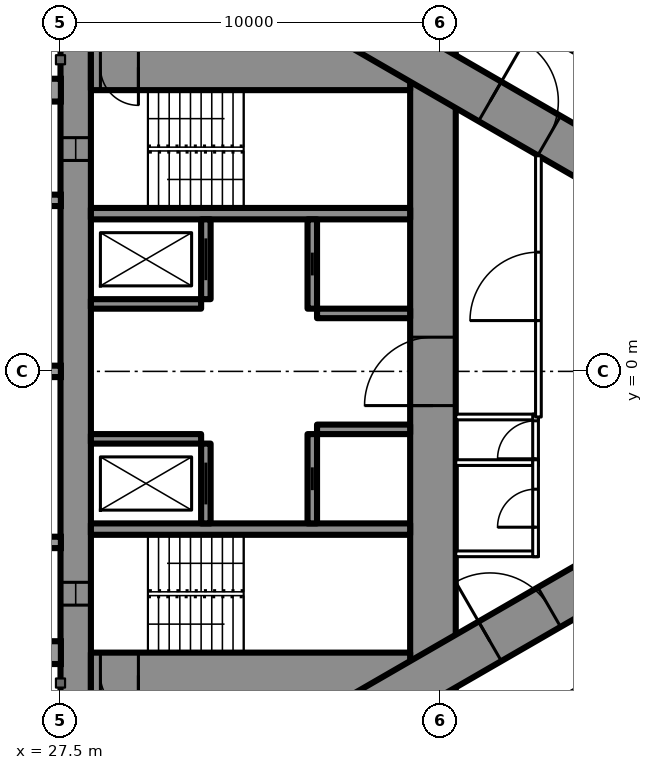
"""IFC4 building model, lengths in metres.
Left out: names, types, materials, properties, quantities, classifications, styles, units other than length and angle.
Written with IfcOpenShell. Run it as: python <this file> out.ifc"""

import sys

from ifc_helpers import new_model, si_unit, direction, frame, frame_2d, origin, place, context, subcontext, project, spatial, rectangle, extrude, element, fill, save


model = new_model("IFC4")
c1 = context("Model", 3, precision=1e-05, world=origin(), true_north=direction((0.0, 1.0)))
c2 = subcontext(c1, "Body", "Model", "MODEL_VIEW")
j1 = project(units=[si_unit("LENGTHUNIT", "METRE"), si_unit("PLANEANGLEUNIT", "RADIAN")], contexts=[c1])
p1 = place(None, origin())
s1 = spatial("IfcSite", under=j1, at=p1, CompositionType="ELEMENT")
p2 = place(p1, origin())
s2 = spatial("IfcBuilding", under=s1, at=p2, CompositionType="ELEMENT")
p3 = place(p2, frame((0.0, 0.0, 60.0)))
s3 = spatial("IfcBuildingStorey", under=s2, at=p3, CompositionType="ELEMENT", Elevation=60.0)
p4 = place(p3, frame((27.9, -8.6, 0.0), z_axis=(0.0, 0.0, 1.0), x_axis=(0.0, 1.0, 0.0)))
e1 = element("IfcWall", 1, at=p4, inside=s3, PredefinedType="SHEAR", context=c2, shape_type="SweptSolid", body=[
    extrude(rectangle(XDim=17.2, YDim=0.8, at=frame_2d((8.6, 0.0))), origin(), (0.0, 0.0, 1.0), 3.5),
])
p5 = place(p4, frame((2.45, 0.0, 0.6)))
e2 = element("IfcOpeningElement", 2, at=p5, cuts=e1, PredefinedType="OPENING", context=c2, shape_type="SweptSolid", body=[
    extrude(rectangle(XDim=0.6, YDim=2.1, at=frame_2d((0.3, 1.05))), frame((0.0, 0.41, 0.0), z_axis=(0.0, -1.0, 0.0), x_axis=(1.0, 0.0, 0.0)), (0.0, 0.0, 1.0), 0.82),
])
p6 = place(p4, frame((14.15, 0.0, 0.6)))
e3 = element("IfcOpeningElement", 3, at=p6, cuts=e1, PredefinedType="OPENING", context=c2, shape_type="SweptSolid", body=[
    extrude(rectangle(XDim=0.6, YDim=2.1, at=frame_2d((0.3, 1.05))), frame((0.0, 0.41, 0.0), z_axis=(0.0, -1.0, 0.0), x_axis=(1.0, 0.0, 0.0)), (0.0, 0.0, 1.0), 0.82),
])
p7 = place(p3, frame((37.3, -8.6, 0.0), z_axis=(0.0, 0.0, 1.0), x_axis=(0.0, 1.0, 0.0)))
e4 = element("IfcWall", 4, at=p7, inside=s3, PredefinedType="SHEAR", context=c2, shape_type="SweptSolid", body=[
    extrude(rectangle(XDim=17.2, YDim=1.2, at=frame_2d((8.6, 0.0))), origin(), (0.0, 0.0, 1.0), 3.5),
])
p8 = place(p7, frame((7.7, 0.0, 0.0)))
e5 = element("IfcOpeningElement", 5, at=p8, cuts=e4, PredefinedType="OPENING", context=c2, shape_type="SweptSolid", body=[
    extrude(rectangle(XDim=1.8, YDim=2.2, at=frame_2d((0.9, 1.1))), frame((0.0, 0.61, 0.0), z_axis=(0.0, -1.0, 0.0), x_axis=(1.0, 0.0, 0.0)), (0.0, 0.0, 1.0), 1.22),
])
p9 = place(p3, frame((28.3, -8.0, 0.0), z_axis=(0.0, 0.0, 1.0), x_axis=(1.0, 0.0, 0.0)))
e6 = element("IfcWall", 6, at=p9, inside=s3, PredefinedType="SHEAR", context=c2, shape_type="SweptSolid", body=[
    extrude(rectangle(XDim=8.4, YDim=1.2, at=frame_2d((4.2, 0.0))), origin(), (0.0, 0.0, 1.0), 3.5),
])
p10 = place(p9, frame((0.25, 0.0, 0.0)))
e7 = element("IfcOpeningElement", 7, at=p10, cuts=e6, PredefinedType="OPENING", context=c2, shape_type="SweptSolid", body=[
    extrude(rectangle(XDim=1.0, YDim=2.2, at=frame_2d((0.5, 1.1))), frame((0.0, 0.61, 0.0), z_axis=(0.0, -1.0, 0.0), x_axis=(1.0, 0.0, 0.0)), (0.0, 0.0, 1.0), 1.22),
])
p11 = place(p3, frame((28.3, 8.0, 0.0), z_axis=(0.0, 0.0, 1.0), x_axis=(1.0, 0.0, 0.0)))
e8 = element("IfcWall", 8, at=p11, inside=s3, PredefinedType="SHEAR", context=c2, shape_type="SweptSolid", body=[
    extrude(rectangle(XDim=8.4, YDim=1.2, at=frame_2d((4.2, 0.0))), origin(), (0.0, 0.0, 1.0), 3.5),
])
p12 = place(p11, frame((0.25, 0.0, 0.0)))
e9 = element("IfcOpeningElement", 9, at=p12, cuts=e8, PredefinedType="OPENING", context=c2, shape_type="SweptSolid", body=[
    extrude(rectangle(XDim=1.0, YDim=2.2, at=frame_2d((0.5, 1.1))), frame((0.0, 0.61, 0.0), z_axis=(0.0, -1.0, 0.0), x_axis=(1.0, 0.0, 0.0)), (0.0, 0.0, 1.0), 1.22),
])
for number, where, z_axis, x_axis in (
    (10, (28.3, -4.15, 0.0), (0.0, 0.0, 1.0), (1.0, 0.0, 0.0)),
    (11, (28.3, 4.15, 0.0), (0.0, 0.0, 1.0), (1.0, 0.0, 0.0)),
):
    element("IfcWall", number, at=place(p3, frame(where, z_axis=z_axis, x_axis=x_axis)), inside=s3, PredefinedType="SHEAR", context=c2, shape_type="SweptSolid", body=[
        extrude(rectangle(XDim=8.4, YDim=0.3, at=frame_2d((4.2, 0.0))), origin(), (0.0, 0.0, 1.0), 3.5),
    ])
p13 = place(p3, frame((31.325, -4.0, 0.0), z_axis=(0.0, 0.0, 1.0), x_axis=(0.0, 1.0, 0.0)))
e12 = element("IfcWall", 12, at=p13, inside=s3, PredefinedType="SHEAR", context=c2, shape_type="SweptSolid", body=[
    extrude(rectangle(XDim=2.1, YDim=0.25, at=frame_2d((1.05, 0.0))), origin(), (0.0, 0.0, 1.0), 3.5),
])
p14 = place(p13, frame((0.5, 0.0, 0.0)))
e13 = element("IfcOpeningElement", 13, at=p14, cuts=e12, PredefinedType="OPENING", context=c2, shape_type="SweptSolid", body=[
    extrude(rectangle(XDim=1.1, YDim=2.2, at=frame_2d((0.55, 1.1))), frame((0.0, 0.135, 0.0), z_axis=(0.0, -1.0, 0.0), x_axis=(1.0, 0.0, 0.0)), (0.0, 0.0, 1.0), 0.27),
])
p15 = place(p3, frame((34.125, -4.0, 0.0), z_axis=(0.0, 0.0, 1.0), x_axis=(0.0, 1.0, 0.0)))
e14 = element("IfcWall", 14, at=p15, inside=s3, PredefinedType="SHEAR", context=c2, shape_type="SweptSolid", body=[
    extrude(rectangle(XDim=2.35, YDim=0.25, at=frame_2d((1.175, 0.0))), origin(), (0.0, 0.0, 1.0), 3.5),
])
p16 = place(p15, frame((0.875, 0.0, 0.0)))
e15 = element("IfcOpeningElement", 15, at=p16, cuts=e14, PredefinedType="OPENING", context=c2, shape_type="SweptSolid", body=[
    extrude(rectangle(XDim=0.6, YDim=2.0, at=frame_2d((0.3, 1.0))), frame((0.0, 0.135, 0.0), z_axis=(0.0, -1.0, 0.0), x_axis=(1.0, 0.0, 0.0)), (0.0, 0.0, 1.0), 0.27),
])
p17 = place(p3, frame((28.3, -1.775, 0.0), z_axis=(0.0, 0.0, 1.0), x_axis=(1.0, 0.0, 0.0)))
e16 = element("IfcWall", 16, at=p17, inside=s3, PredefinedType="SHEAR", context=c2, shape_type="SweptSolid", body=[
    extrude(rectangle(XDim=2.9, YDim=0.25, at=frame_2d((1.45, 0.0))), origin(), (0.0, 0.0, 1.0), 3.5),
])
p18 = place(p3, frame((34.25, -1.525, 0.0), z_axis=(0.0, 0.0, 1.0), x_axis=(1.0, 0.0, 0.0)))
e17 = element("IfcWall", 17, at=p18, inside=s3, PredefinedType="SHEAR", context=c2, shape_type="SweptSolid", body=[
    extrude(rectangle(XDim=2.45, YDim=0.25, at=frame_2d((1.225, 0.0))), origin(), (0.0, 0.0, 1.0), 3.5),
])
p19 = place(p3, frame((31.325, 1.9, 0.0), z_axis=(0.0, 0.0, 1.0), x_axis=(0.0, 1.0, 0.0)))
e18 = element("IfcWall", 18, at=p19, inside=s3, PredefinedType="SHEAR", context=c2, shape_type="SweptSolid", body=[
    extrude(rectangle(XDim=2.1, YDim=0.25, at=frame_2d((1.05, 0.0))), origin(), (0.0, 0.0, 1.0), 3.5),
])
p20 = place(p19, frame((0.5, 0.0, 0.0)))
e19 = element("IfcOpeningElement", 19, at=p20, cuts=e18, PredefinedType="OPENING", context=c2, shape_type="SweptSolid", body=[
    extrude(rectangle(XDim=1.1, YDim=2.2, at=frame_2d((0.55, 1.1))), frame((0.0, 0.135, 0.0), z_axis=(0.0, -1.0, 0.0), x_axis=(1.0, 0.0, 0.0)), (0.0, 0.0, 1.0), 0.27),
])
p21 = place(p3, frame((34.125, 1.65, 0.0), z_axis=(0.0, 0.0, 1.0), x_axis=(0.0, 1.0, 0.0)))
e20 = element("IfcWall", 20, at=p21, inside=s3, PredefinedType="SHEAR", context=c2, shape_type="SweptSolid", body=[
    extrude(rectangle(XDim=2.35, YDim=0.25, at=frame_2d((1.175, 0.0))), origin(), (0.0, 0.0, 1.0), 3.5),
])
p22 = place(p21, frame((0.875, 0.0, 0.0)))
e21 = element("IfcOpeningElement", 21, at=p22, cuts=e20, PredefinedType="OPENING", context=c2, shape_type="SweptSolid", body=[
    extrude(rectangle(XDim=0.6, YDim=2.0, at=frame_2d((0.3, 1.0))), frame((0.0, 0.135, 0.0), z_axis=(0.0, -1.0, 0.0), x_axis=(1.0, 0.0, 0.0)), (0.0, 0.0, 1.0), 0.27),
])
p23 = place(p3, frame((28.3, 1.775, 0.0), z_axis=(0.0, 0.0, 1.0), x_axis=(1.0, 0.0, 0.0)))
e22 = element("IfcWall", 22, at=p23, inside=s3, PredefinedType="SHEAR", context=c2, shape_type="SweptSolid", body=[
    extrude(rectangle(XDim=2.9, YDim=0.25, at=frame_2d((1.45, 0.0))), origin(), (0.0, 0.0, 1.0), 3.5),
])
p24 = place(p3, frame((34.25, 1.525, 0.0), z_axis=(0.0, 0.0, 1.0), x_axis=(1.0, 0.0, 0.0)))
e23 = element("IfcWall", 23, at=p24, inside=s3, PredefinedType="SHEAR", context=c2, shape_type="SweptSolid", body=[
    extrude(rectangle(XDim=2.45, YDim=0.25, at=frame_2d((1.225, 0.0))), origin(), (0.0, 0.0, 1.0), 3.5),
])
p25 = place(p3, frame((27.2, -13.8, 0.0), z_axis=(0.0, 0.0, 1.0), x_axis=(0.866027159892, 0.499996958321, 0.0)))
e24 = element("IfcWall", 24, at=p25, inside=s3, PredefinedType="SHEAR", context=c2, shape_type="SweptSolid", body=[
    extrude(rectangle(XDim=27.947, YDim=1.2, at=frame_2d((13.973, 0.0))), origin(), (0.0, 0.0, 1.0), 3.5),
])
p26 = place(p25, frame((4.6, 0.0, 0.0)))
e25 = element("IfcOpeningElement", 25, at=p26, cuts=e24, PredefinedType="OPENING", context=c2, shape_type="SweptSolid", body=[
    extrude(rectangle(XDim=1.0, YDim=2.2, at=frame_2d((0.5, 1.1))), frame((0.0, 0.61, 0.0), z_axis=(0.0, -1.0, 0.0), x_axis=(1.0, 0.0, 0.0)), (0.0, 0.0, 1.0), 1.22),
])
p27 = place(p25, frame((13.395, 0.0, 0.0)))
e26 = element("IfcOpeningElement", 26, at=p27, cuts=e24, PredefinedType="OPENING", context=c2, shape_type="SweptSolid", body=[
    extrude(rectangle(XDim=1.8, YDim=2.2, at=frame_2d((0.9, 1.1))), frame((0.0, 0.61, 0.0), z_axis=(0.0, -1.0, 0.0), x_axis=(1.0, 0.0, 0.0)), (0.0, 0.0, 1.0), 1.22),
])
p28 = place(p3, frame((27.2, 13.8, 0.0), z_axis=(0.0, 0.0, 1.0), x_axis=(0.866024515034, -0.500001539357, 0.0)))
e27 = element("IfcWall", 27, at=p28, inside=s3, PredefinedType="SHEAR", context=c2, shape_type="SweptSolid", body=[
    extrude(rectangle(XDim=26.907, YDim=1.2, at=frame_2d((13.454, 0.0))), origin(), (0.0, 0.0, 1.0), 3.5),
])
p29 = place(p28, frame((4.6, 0.0, 0.0)))
e28 = element("IfcOpeningElement", 28, at=p29, cuts=e27, PredefinedType="OPENING", context=c2, shape_type="SweptSolid", body=[
    extrude(rectangle(XDim=1.0, YDim=2.2, at=frame_2d((0.5, 1.1))), frame((0.0, 0.61, 0.0), z_axis=(0.0, -1.0, 0.0), x_axis=(1.0, 0.0, 0.0)), (0.0, 0.0, 1.0), 1.22),
])
p30 = place(p28, frame((13.395, 0.0, 0.0)))
e29 = element("IfcOpeningElement", 29, at=p30, cuts=e27, PredefinedType="OPENING", context=c2, shape_type="SweptSolid", body=[
    extrude(rectangle(XDim=1.8, YDim=2.2, at=frame_2d((0.9, 1.1))), frame((0.0, 0.61, 0.0), z_axis=(0.0, -1.0, 0.0), x_axis=(1.0, 0.0, 0.0)), (0.0, 0.0, 1.0), 1.22),
])
p31 = place(p3, frame((36.834, 10.894, 0.0), z_axis=(0.0, 0.0, 1.0), x_axis=(0.866028157229, -0.499995230863, 0.0)))
e30 = element("IfcWall", 30, at=p31, inside=s3, PredefinedType="PARTITIONING", context=c2, shape_type="SweptSolid", body=[
    extrude(rectangle(XDim=21.667, YDim=0.2, at=frame_2d((10.833, 0.0))), origin(), (0.0, 0.0, 1.0), 3.25),
])
p32 = place(p31, frame((14.55, 0.0, 0.0)))
e31 = element("IfcOpeningElement", 31, at=p32, cuts=e30, PredefinedType="OPENING", context=c2, shape_type="SweptSolid", body=[
    extrude(rectangle(XDim=0.95, YDim=2.2, at=frame_2d((0.475, 1.1))), frame((0.0, 0.11, 0.0), z_axis=(0.0, -1.0, 0.0), x_axis=(1.0, 0.0, 0.0)), (0.0, 0.0, 1.0), 0.22),
])
p33 = place(p31, frame((10.5, 0.0, 0.0)))
e32 = element("IfcOpeningElement", 32, at=p33, cuts=e30, PredefinedType="OPENING", context=c2, shape_type="SweptSolid", body=[
    extrude(rectangle(XDim=0.95, YDim=2.2, at=frame_2d((0.475, 1.1))), frame((0.0, 0.11, 0.0), z_axis=(0.0, -1.0, 0.0), x_axis=(1.0, 0.0, 0.0)), (0.0, 0.0, 1.0), 0.22),
])
p34 = place(p31, frame((4.292, 0.0, 0.0)))
e33 = element("IfcOpeningElement", 33, at=p34, cuts=e30, PredefinedType="OPENING", context=c2, shape_type="SweptSolid", body=[
    extrude(rectangle(XDim=1.0, YDim=2.2, at=frame_2d((0.5, 1.1))), frame((0.0, 0.11, 0.0), z_axis=(0.0, -1.0, 0.0), x_axis=(1.0, 0.0, 0.0)), (0.0, 0.0, 1.0), 0.22),
])
p35 = place(p31, frame((0.246, 0.0, 0.0)))
e34 = element("IfcOpeningElement", 34, at=p35, cuts=e30, PredefinedType="OPENING", context=c2, shape_type="SweptSolid", body=[
    extrude(rectangle(XDim=0.9, YDim=2.2, at=frame_2d((0.45, 1.1))), frame((0.0, 0.11, 0.0), z_axis=(0.0, -1.0, 0.0), x_axis=(1.0, 0.0, 0.0)), (0.0, 0.0, 1.0), 0.22),
])
p36 = place(p3, frame((37.96, -10.243, 0.0), z_axis=(0.0, 0.0, 1.0), x_axis=(0.866030548046, 0.499991089772, 0.0)))
e35 = element("IfcWall", 35, at=p36, inside=s3, PredefinedType="PARTITIONING", context=c2, shape_type="SweptSolid", body=[
    extrude(rectangle(XDim=12.849, YDim=0.2, at=frame_2d((6.425, 0.0))), origin(), (0.0, 0.0, 1.0), 3.25),
])
p37 = place(p36, frame((4.575, 0.0, 0.0)))
e36 = element("IfcOpeningElement", 36, at=p37, cuts=e35, PredefinedType="OPENING", context=c2, shape_type="SweptSolid", body=[
    extrude(rectangle(XDim=0.95, YDim=2.2, at=frame_2d((0.475, 1.1))), frame((0.0, 0.11, 0.0), z_axis=(0.0, -1.0, 0.0), x_axis=(1.0, 0.0, 0.0)), (0.0, 0.0, 1.0), 0.22),
])
p38 = place(p36, frame((0.6, 0.0, 0.0)))
e37 = element("IfcOpeningElement", 37, at=p38, cuts=e35, PredefinedType="OPENING", context=c2, shape_type="SweptSolid", body=[
    extrude(rectangle(XDim=0.95, YDim=2.2, at=frame_2d((0.475, 1.1))), frame((0.0, 0.11, 0.0), z_axis=(0.0, -1.0, 0.0), x_axis=(1.0, 0.0, 0.0)), (0.0, 0.0, 1.0), 0.22),
])
for number, where, z_axis, x_axis in (
    (38, (37.9, -1.2, 0.0), (0.0, 0.0, 1.0), (1.0, 0.0, 0.0)),
    (39, (37.9, -2.4, 0.0), (0.0, 0.0, 1.0), (1.0, 0.0, 0.0)),
    (40, (37.9, -4.8, 0.0), (0.0, 0.0, 1.0), (1.0, 0.0, 0.0)),
):
    element("IfcWall", number, at=place(p3, frame(where, z_axis=z_axis, x_axis=x_axis)), inside=s3, PredefinedType="PARTITIONING", context=c2, shape_type="SweptSolid", body=[
        extrude(rectangle(XDim=2.175, YDim=0.15, at=frame_2d((1.087, 0.0))), origin(), (0.0, 0.0, 1.0), 3.25),
    ])
p39 = place(p3, frame((40.0, -2.475, 0.0), z_axis=(0.0, 0.0, 1.0), x_axis=(0.0, 1.0, 0.0)))
e41 = element("IfcWall", 41, at=p39, inside=s3, PredefinedType="PARTITIONING", context=c2, shape_type="SweptSolid", body=[
    extrude(rectangle(XDim=1.35, YDim=0.15, at=frame_2d((0.675, 0.0))), origin(), (0.0, 0.0, 1.0), 3.25),
])
p40 = place(p39, frame((0.175, 0.0, 0.0)))
e42 = element("IfcOpeningElement", 42, at=p40, cuts=e41, PredefinedType="OPENING", context=c2, shape_type="SweptSolid", body=[
    extrude(rectangle(XDim=1.0, YDim=2.2, at=frame_2d((0.5, 1.1))), frame((0.0, 0.085, 0.0), z_axis=(0.0, -1.0, 0.0), x_axis=(1.0, 0.0, 0.0)), (0.0, 0.0, 1.0), 0.17),
])
p41 = place(p3, frame((40.0, -4.875, 0.0), z_axis=(0.0, 0.0, 1.0), x_axis=(0.0, 1.0, 0.0)))
e43 = element("IfcWall", 43, at=p41, inside=s3, PredefinedType="PARTITIONING", context=c2, shape_type="SweptSolid", body=[
    extrude(rectangle(XDim=2.55, YDim=0.15, at=frame_2d((1.275, 0.0))), origin(), (0.0, 0.0, 1.0), 3.25),
])
p42 = place(p41, frame((0.775, 0.0, 0.0)))
e44 = element("IfcOpeningElement", 44, at=p42, cuts=e43, PredefinedType="OPENING", context=c2, shape_type="SweptSolid", body=[
    extrude(rectangle(XDim=1.0, YDim=2.2, at=frame_2d((0.5, 1.1))), frame((0.0, 0.085, 0.0), z_axis=(0.0, -1.0, 0.0), x_axis=(1.0, 0.0, 0.0)), (0.0, 0.0, 1.0), 0.17),
])
p43 = place(p3, frame((40.075, -1.2, 0.0), z_axis=(0.0, 0.0, 1.0), x_axis=(0.0, 1.0, 0.0)))
e45 = element("IfcWall", 45, at=p43, inside=s3, PredefinedType="PARTITIONING", context=c2, shape_type="SweptSolid", body=[
    extrude(rectangle(XDim=6.874, YDim=0.15, at=frame_2d((3.437, 0.0))), origin(), (0.0, 0.0, 1.0), 3.25),
])
p44 = place(p43, frame((2.537, 0.0, 0.0)))
e46 = element("IfcOpeningElement", 46, at=p44, cuts=e45, PredefinedType="OPENING", context=c2, shape_type="SweptSolid", body=[
    extrude(rectangle(XDim=1.8, YDim=2.2, at=frame_2d((0.9, 1.1))), frame((0.0, 0.085, 0.0), z_axis=(0.0, -1.0, 0.0), x_axis=(1.0, 0.0, 0.0)), (0.0, 0.0, 1.0), 0.17),
])
p45 = place(p34, origin())
e47 = element("IfcDoor", 47, at=p45, inside=s3, OperationType="SINGLE_SWING_LEFT", PredefinedType="DOOR", context=c2, shape_type="SweptSolid", body=[
    extrude(rectangle(XDim=1.0, YDim=2.2, at=frame_2d((0.5, 1.1))), frame((0.0, 0.025, 0.0), z_axis=(0.0, -1.0, 0.0), x_axis=(1.0, 0.0, 0.0)), (0.0, 0.0, 1.0), 0.05),
])
fill(e33, e47)
p46 = place(p40, origin())
e48 = element("IfcDoor", 48, at=p46, inside=s3, OperationType="SINGLE_SWING_LEFT", PredefinedType="DOOR", context=c2, shape_type="SweptSolid", body=[
    extrude(rectangle(XDim=1.0, YDim=2.2, at=frame_2d((0.5, 1.1))), frame((0.0, 0.025, 0.0), z_axis=(0.0, -1.0, 0.0), x_axis=(1.0, 0.0, 0.0)), (0.0, 0.0, 1.0), 0.05),
])
fill(e42, e48)
p47 = place(p42, origin())
e49 = element("IfcDoor", 49, at=p47, inside=s3, OperationType="SINGLE_SWING_LEFT", PredefinedType="DOOR", context=c2, shape_type="SweptSolid", body=[
    extrude(rectangle(XDim=1.0, YDim=2.2, at=frame_2d((0.5, 1.1))), frame((0.0, 0.025, 0.0), z_axis=(0.0, -1.0, 0.0), x_axis=(1.0, 0.0, 0.0)), (0.0, 0.0, 1.0), 0.05),
])
fill(e44, e49)
p48 = place(p44, origin())
e50 = element("IfcDoor", 50, at=p48, inside=s3, OperationType="DOUBLE_DOOR_SINGLE_SWING", PredefinedType="DOOR", context=c2, shape_type="SweptSolid", body=[
    extrude(rectangle(XDim=1.8, YDim=2.2, at=frame_2d((0.9, 1.1))), frame((0.0, 0.025, 0.0), z_axis=(0.0, -1.0, 0.0), x_axis=(1.0, 0.0, 0.0)), (0.0, 0.0, 1.0), 0.05),
])
fill(e46, e50)
p49 = place(p27, origin())
e51 = element("IfcDoor", 51, at=p49, inside=s3, OperationType="DOUBLE_DOOR_SINGLE_SWING", PredefinedType="DOOR", context=c2, shape_type="SweptSolid", body=[
    extrude(rectangle(XDim=1.8, YDim=2.2, at=frame_2d((0.9, 1.1))), frame((0.0, 0.025, 0.0), z_axis=(0.0, -1.0, 0.0), x_axis=(1.0, 0.0, 0.0)), (0.0, 0.0, 1.0), 0.05),
])
fill(e26, e51)
p50 = place(p30, origin())
e52 = element("IfcDoor", 52, at=p50, inside=s3, OperationType="DOUBLE_DOOR_SINGLE_SWING", PredefinedType="DOOR", context=c2, shape_type="SweptSolid", body=[
    extrude(rectangle(XDim=1.8, YDim=2.2, at=frame_2d((0.9, 1.1))), frame((0.0, 0.025, 0.0), z_axis=(0.0, -1.0, 0.0), x_axis=(1.0, 0.0, 0.0)), (0.0, 0.0, 1.0), 0.05),
])
fill(e29, e52)
p51 = place(p8, origin())
e53 = element("IfcDoor", 53, at=p51, inside=s3, OperationType="DOUBLE_DOOR_SINGLE_SWING", PredefinedType="DOOR", context=c2, shape_type="SweptSolid", body=[
    extrude(rectangle(XDim=1.8, YDim=2.2, at=frame_2d((0.9, 1.1))), frame((0.0, 0.025, 0.0), z_axis=(0.0, -1.0, 0.0), x_axis=(1.0, 0.0, 0.0)), (0.0, 0.0, 1.0), 0.05),
])
fill(e5, e53)
p52 = place(p10, origin())
e54 = element("IfcDoor", 54, at=p52, inside=s3, OperationType="SINGLE_SWING_RIGHT", PredefinedType="DOOR", context=c2, shape_type="SweptSolid", body=[
    extrude(rectangle(XDim=1.0, YDim=2.2, at=frame_2d((0.5, 1.1))), frame((0.0, 0.025, 0.0), z_axis=(0.0, -1.0, 0.0), x_axis=(1.0, 0.0, 0.0)), (0.0, 0.0, 1.0), 0.05),
])
fill(e7, e54)
p53 = place(p12, origin())
e55 = element("IfcDoor", 55, at=p53, inside=s3, OperationType="SINGLE_SWING_RIGHT", PredefinedType="DOOR", context=c2, shape_type="SweptSolid", body=[
    extrude(rectangle(XDim=1.0, YDim=2.2, at=frame_2d((0.5, 1.1))), frame((0.0, 0.025, 0.0), z_axis=(0.0, -1.0, 0.0), x_axis=(1.0, 0.0, 0.0)), (0.0, 0.0, 1.0), 0.05),
])
fill(e9, e55)
p54 = place(p14, origin())
e56 = element("IfcDoor", 56, at=p54, inside=s3, OperationType="SLIDING_TO_LEFT", PredefinedType="USERDEFINED", context=c2, shape_type="SweptSolid", body=[
    extrude(rectangle(XDim=1.1, YDim=2.2, at=frame_2d((0.55, 1.1))), frame((0.0, 0.025, 0.0), z_axis=(0.0, -1.0, 0.0), x_axis=(1.0, 0.0, 0.0)), (0.0, 0.0, 1.0), 0.05),
])
fill(e13, e56)
p55 = place(p20, origin())
e57 = element("IfcDoor", 57, at=p55, inside=s3, OperationType="SLIDING_TO_LEFT", PredefinedType="USERDEFINED", context=c2, shape_type="SweptSolid", body=[
    extrude(rectangle(XDim=1.1, YDim=2.2, at=frame_2d((0.55, 1.1))), frame((0.0, 0.025, 0.0), z_axis=(0.0, -1.0, 0.0), x_axis=(1.0, 0.0, 0.0)), (0.0, 0.0, 1.0), 0.05),
])
fill(e19, e57)
p56 = place(p16, origin())
e58 = element("IfcDoor", 58, at=p56, inside=s3, OperationType="SLIDING_TO_LEFT", PredefinedType="DOOR", context=c2, shape_type="SweptSolid", body=[
    extrude(rectangle(XDim=0.6, YDim=2.0, at=frame_2d((0.3, 1.0))), frame((0.0, 0.025, 0.0), z_axis=(0.0, -1.0, 0.0), x_axis=(1.0, 0.0, 0.0)), (0.0, 0.0, 1.0), 0.05),
])
fill(e15, e58)
p57 = place(p22, origin())
e59 = element("IfcDoor", 59, at=p57, inside=s3, OperationType="SLIDING_TO_LEFT", PredefinedType="DOOR", context=c2, shape_type="SweptSolid", body=[
    extrude(rectangle(XDim=0.6, YDim=2.0, at=frame_2d((0.3, 1.0))), frame((0.0, 0.025, 0.0), z_axis=(0.0, -1.0, 0.0), x_axis=(1.0, 0.0, 0.0)), (0.0, 0.0, 1.0), 0.05),
])
fill(e21, e59)
p58 = place(p5, origin())
e60 = element("IfcWindow", 60, at=p58, inside=s3, PartitioningType="SINGLE_PANEL", PredefinedType="WINDOW", context=c2, shape_type="SweptSolid", body=[
    extrude(rectangle(XDim=0.6, YDim=2.1, at=frame_2d((0.3, 1.05))), frame((0.0, 0.03, 0.0), z_axis=(0.0, -1.0, 0.0), x_axis=(1.0, 0.0, 0.0)), (0.0, 0.0, 1.0), 0.06),
])
fill(e2, e60)
p59 = place(p6, origin())
e61 = element("IfcWindow", 61, at=p59, inside=s3, PartitioningType="SINGLE_PANEL", PredefinedType="WINDOW", context=c2, shape_type="SweptSolid", body=[
    extrude(rectangle(XDim=0.6, YDim=2.1, at=frame_2d((0.3, 1.05))), frame((0.0, 0.03, 0.0), z_axis=(0.0, -1.0, 0.0), x_axis=(1.0, 0.0, 0.0)), (0.0, 0.0, 1.0), 0.06),
])
fill(e3, e61)
save(model, sys.argv[1])
